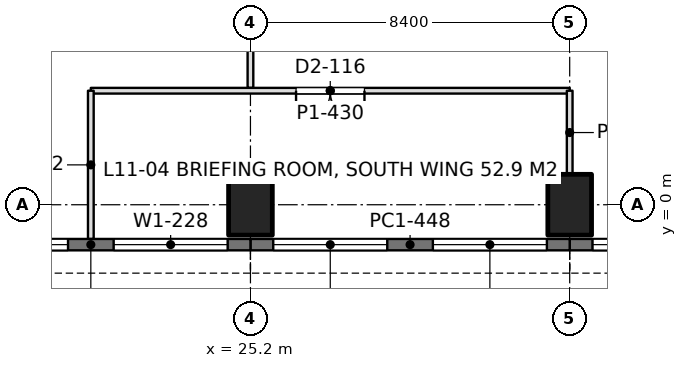
"""IFC4 building model, lengths in metres.
Left out: names, types, materials, properties, quantities, classifications, styles, units other than length and angle.
Written with IfcOpenShell. Run it as: python <this file> out.ifc"""

import sys

from ifc_helpers import new_model, si_unit, direction, frame, frame_2d, origin, origin_2d, place, context, subcontext, project, spatial, rectangle, extrude, element, fill, save


model = new_model("IFC4")
c1 = context("Model", 3, precision=1e-05, world=origin(), true_north=direction((0.0, 1.0)))
c2 = subcontext(c1, "Body", "Model", "MODEL_VIEW")
j1 = project(units=[si_unit("LENGTHUNIT", "METRE"), si_unit("PLANEANGLEUNIT", "RADIAN")], contexts=[c1])
p1 = place(None, origin())
s1 = spatial("IfcSite", under=j1, at=p1, CompositionType="ELEMENT")
p2 = place(p1, origin())
s2 = spatial("IfcBuilding", under=s1, at=p2, CompositionType="ELEMENT")
p3 = place(p2, frame((0.0, 0.0, 50.4)))
s3 = spatial("IfcBuildingStorey", under=s2, at=p3, CompositionType="ELEMENT", Elevation=50.4)
for number, where, z_axis, x_axis in (
    (1, (25.2, 0.0, 0.0), (0.0, 0.0, 1.0), (1.0, 0.0, 0.0)),
    (2, (33.6, 0.0, 0.0), (0.0, 0.0, 1.0), (1.0, 0.0, 0.0)),
):
    element("IfcColumn", number, at=place(p3, frame(where, z_axis=z_axis, x_axis=x_axis)), inside=s3, PredefinedType="COLUMN", context=c2, shape_type="SweptSolid", body=[
        extrude(rectangle(XDim=1.15, YDim=1.6, at=origin_2d()), origin(), (0.0, 0.0, 1.0), 4.5),
    ])
p4 = place(p3, frame((42.0, -1.05, 0.0), z_axis=(0.0, 0.0, 1.0), x_axis=(-1.0, 0.0, 0.0)))
e3 = element("IfcWall", 3, at=p4, inside=s3, PredefinedType="SOLIDWALL", context=c2, shape_type="SweptSolid", body=[
    extrude(rectangle(XDim=8.4, YDim=0.3, at=frame_2d((4.2, 0.0))), origin(), (0.0, 0.0, 1.0), 4.34),
])
p5 = place(p4, frame((0.6, 0.0, 0.9)))
e4 = element("IfcOpeningElement", 4, at=p5, cuts=e3, PredefinedType="OPENING", context=c2, shape_type="SweptSolid", body=[
    extrude(rectangle(XDim=3.0, YDim=1.9, at=frame_2d((1.5, 0.95))), frame((0.0, 0.16, 0.0), z_axis=(0.0, -1.0, 0.0), x_axis=(1.0, 0.0, 0.0)), (0.0, 0.0, 1.0), 0.32),
])
p6 = place(p4, frame((4.8, 0.0, 0.9)))
e5 = element("IfcOpeningElement", 5, at=p6, cuts=e3, PredefinedType="OPENING", context=c2, shape_type="SweptSolid", body=[
    extrude(rectangle(XDim=3.0, YDim=1.9, at=frame_2d((1.5, 0.95))), frame((0.0, 0.16, 0.0), z_axis=(0.0, -1.0, 0.0), x_axis=(1.0, 0.0, 0.0)), (0.0, 0.0, 1.0), 0.32),
])
p7 = place(p3, frame((33.6, -1.05, 0.0), z_axis=(0.0, 0.0, 1.0), x_axis=(-1.0, 0.0, 0.0)))
e6 = element("IfcWall", 6, at=p7, inside=s3, PredefinedType="SOLIDWALL", context=c2, shape_type="SweptSolid", body=[
    extrude(rectangle(XDim=8.4, YDim=0.3, at=frame_2d((4.2, 0.0))), origin(), (0.0, 0.0, 1.0), 4.34),
])
p8 = place(p7, frame((0.6, 0.0, 0.9)))
e7 = element("IfcOpeningElement", 7, at=p8, cuts=e6, PredefinedType="OPENING", context=c2, shape_type="SweptSolid", body=[
    extrude(rectangle(XDim=3.0, YDim=1.9, at=frame_2d((1.5, 0.95))), frame((0.0, 0.16, 0.0), z_axis=(0.0, -1.0, 0.0), x_axis=(1.0, 0.0, 0.0)), (0.0, 0.0, 1.0), 0.32),
])
p9 = place(p7, frame((4.8, 0.0, 0.9)))
e8 = element("IfcOpeningElement", 8, at=p9, cuts=e6, PredefinedType="OPENING", context=c2, shape_type="SweptSolid", body=[
    extrude(rectangle(XDim=3.0, YDim=1.9, at=frame_2d((1.5, 0.95))), frame((0.0, 0.16, 0.0), z_axis=(0.0, -1.0, 0.0), x_axis=(1.0, 0.0, 0.0)), (0.0, 0.0, 1.0), 0.32),
])
p10 = place(p3, frame((25.2, -1.05, 0.0), z_axis=(0.0, 0.0, 1.0), x_axis=(-1.0, 0.0, 0.0)))
e9 = element("IfcWall", 9, at=p10, inside=s3, PredefinedType="SOLIDWALL", context=c2, shape_type="SweptSolid", body=[
    extrude(rectangle(XDim=8.4, YDim=0.3, at=frame_2d((4.2, 0.0))), origin(), (0.0, 0.0, 1.0), 4.34),
])
p11 = place(p10, frame((0.6, 0.0, 0.9)))
e10 = element("IfcOpeningElement", 10, at=p11, cuts=e9, PredefinedType="OPENING", context=c2, shape_type="SweptSolid", body=[
    extrude(rectangle(XDim=3.0, YDim=1.9, at=frame_2d((1.5, 0.95))), frame((0.0, 0.16, 0.0), z_axis=(0.0, -1.0, 0.0), x_axis=(1.0, 0.0, 0.0)), (0.0, 0.0, 1.0), 0.32),
])
p12 = place(p10, frame((4.8, 0.0, 0.9)))
e11 = element("IfcOpeningElement", 11, at=p12, cuts=e9, PredefinedType="OPENING", context=c2, shape_type="SweptSolid", body=[
    extrude(rectangle(XDim=3.0, YDim=1.9, at=frame_2d((1.5, 0.95))), frame((0.0, 0.16, 0.0), z_axis=(0.0, -1.0, 0.0), x_axis=(1.0, 0.0, 0.0)), (0.0, 0.0, 1.0), 0.32),
])
p13 = place(p3, frame((21.0, 3.0, 0.0), z_axis=(0.0, 0.0, 1.0), x_axis=(1.0, 0.0, 0.0)))
e12 = element("IfcWall", 12, at=p13, inside=s3, PredefinedType="PARTITIONING", context=c2, shape_type="SweptSolid", body=[
    extrude(rectangle(XDim=12.6, YDim=0.15, at=frame_2d((6.3, 0.0))), origin(), (0.0, 0.0, 1.0), 3.74),
])
p14 = place(p13, frame((5.4, 0.0, 0.0)))
e13 = element("IfcOpeningElement", 13, at=p14, cuts=e12, PredefinedType="OPENING", context=c2, shape_type="SweptSolid", body=[
    extrude(rectangle(XDim=1.8, YDim=2.2, at=frame_2d((0.9, 1.1))), frame((0.0, 0.085, 0.0), z_axis=(0.0, -1.0, 0.0), x_axis=(1.0, 0.0, 0.0)), (0.0, 0.0, 1.0), 0.17),
])
p15 = place(p3, frame((21.0, -0.902, 0.0), z_axis=(0.0, 0.0, 1.0), x_axis=(0.0, 1.0, 0.0)))
e14 = element("IfcWall", 14, at=p15, inside=s3, PredefinedType="PARTITIONING", context=c2, shape_type="SweptSolid", body=[
    extrude(rectangle(XDim=3.902, YDim=0.15, at=frame_2d((1.951, 0.0))), origin(), (0.0, 0.0, 1.0), 3.84),
])
p16 = place(p3, frame((33.6, 0.799, 0.0), z_axis=(0.0, 0.0, 1.0), x_axis=(0.0, 1.0, 0.0)))
e15 = element("IfcWall", 15, at=p16, inside=s3, PredefinedType="PARTITIONING", context=c2, shape_type="SweptSolid", body=[
    extrude(rectangle(XDim=2.201, YDim=0.15, at=frame_2d((1.101, 0.0))), origin(), (0.0, 0.0, 1.0), 3.74),
])
p17 = place(p3, frame((25.2, 3.074, 0.0), z_axis=(0.0, 0.0, 1.0), x_axis=(0.0, 1.0, 0.0)))
e16 = element("IfcWall", 16, at=p17, inside=s3, PredefinedType="PARTITIONING", context=c2, shape_type="SweptSolid", body=[
    extrude(rectangle(XDim=4.427, YDim=0.15, at=frame_2d((2.213, 0.0))), origin(), (0.0, 0.0, 1.0), 3.74),
])
p18 = place(p6, origin())
e17 = element("IfcWindow", 17, at=p18, inside=s3, PartitioningType="SINGLE_PANEL", PredefinedType="WINDOW", context=c2, shape_type="SweptSolid", body=[
    extrude(rectangle(XDim=3.0, YDim=1.9, at=frame_2d((1.5, 0.95))), frame((0.0, 0.03, 0.0), z_axis=(0.0, -1.0, 0.0), x_axis=(1.0, 0.0, 0.0)), (0.0, 0.0, 1.0), 0.06),
])
fill(e5, e17)
p19 = place(p8, origin())
e18 = element("IfcWindow", 18, at=p19, inside=s3, PartitioningType="SINGLE_PANEL", PredefinedType="WINDOW", context=c2, shape_type="SweptSolid", body=[
    extrude(rectangle(XDim=3.0, YDim=1.9, at=frame_2d((1.5, 0.95))), frame((0.0, 0.03, 0.0), z_axis=(0.0, -1.0, 0.0), x_axis=(1.0, 0.0, 0.0)), (0.0, 0.0, 1.0), 0.06),
])
fill(e7, e18)
p20 = place(p9, origin())
e19 = element("IfcWindow", 19, at=p20, inside=s3, PartitioningType="SINGLE_PANEL", PredefinedType="WINDOW", context=c2, shape_type="SweptSolid", body=[
    extrude(rectangle(XDim=3.0, YDim=1.9, at=frame_2d((1.5, 0.95))), frame((0.0, 0.03, 0.0), z_axis=(0.0, -1.0, 0.0), x_axis=(1.0, 0.0, 0.0)), (0.0, 0.0, 1.0), 0.06),
])
fill(e8, e19)
p21 = place(p11, origin())
e20 = element("IfcWindow", 20, at=p21, inside=s3, PartitioningType="SINGLE_PANEL", PredefinedType="WINDOW", context=c2, shape_type="SweptSolid", body=[
    extrude(rectangle(XDim=3.0, YDim=1.9, at=frame_2d((1.5, 0.95))), frame((0.0, 0.03, 0.0), z_axis=(0.0, -1.0, 0.0), x_axis=(1.0, 0.0, 0.0)), (0.0, 0.0, 1.0), 0.06),
])
fill(e10, e20)
p22 = place(p12, origin())
e21 = element("IfcWindow", 21, at=p22, inside=s3, PartitioningType="SINGLE_PANEL", PredefinedType="WINDOW", context=c2, shape_type="SweptSolid", body=[
    extrude(rectangle(XDim=3.0, YDim=1.9, at=frame_2d((1.5, 0.95))), frame((0.0, 0.03, 0.0), z_axis=(0.0, -1.0, 0.0), x_axis=(1.0, 0.0, 0.0)), (0.0, 0.0, 1.0), 0.06),
])
fill(e11, e21)
p23 = place(p14, frame((1.8, 0.0, 0.0), z_axis=(0.0, 0.0, 1.0), x_axis=(-1.0, 0.0, 0.0)))
e22 = element("IfcDoor", 22, at=p23, inside=s3, OperationType="DOUBLE_DOOR_SINGLE_SWING", PredefinedType="DOOR", context=c2, shape_type="SweptSolid", body=[
    extrude(rectangle(XDim=1.8, YDim=2.2, at=frame_2d((0.9, 1.1))), frame((0.0, 0.025, 0.0), z_axis=(0.0, -1.0, 0.0), x_axis=(1.0, 0.0, 0.0)), (0.0, 0.0, 1.0), 0.05),
])
fill(e13, e22)
save(model, sys.argv[1])
